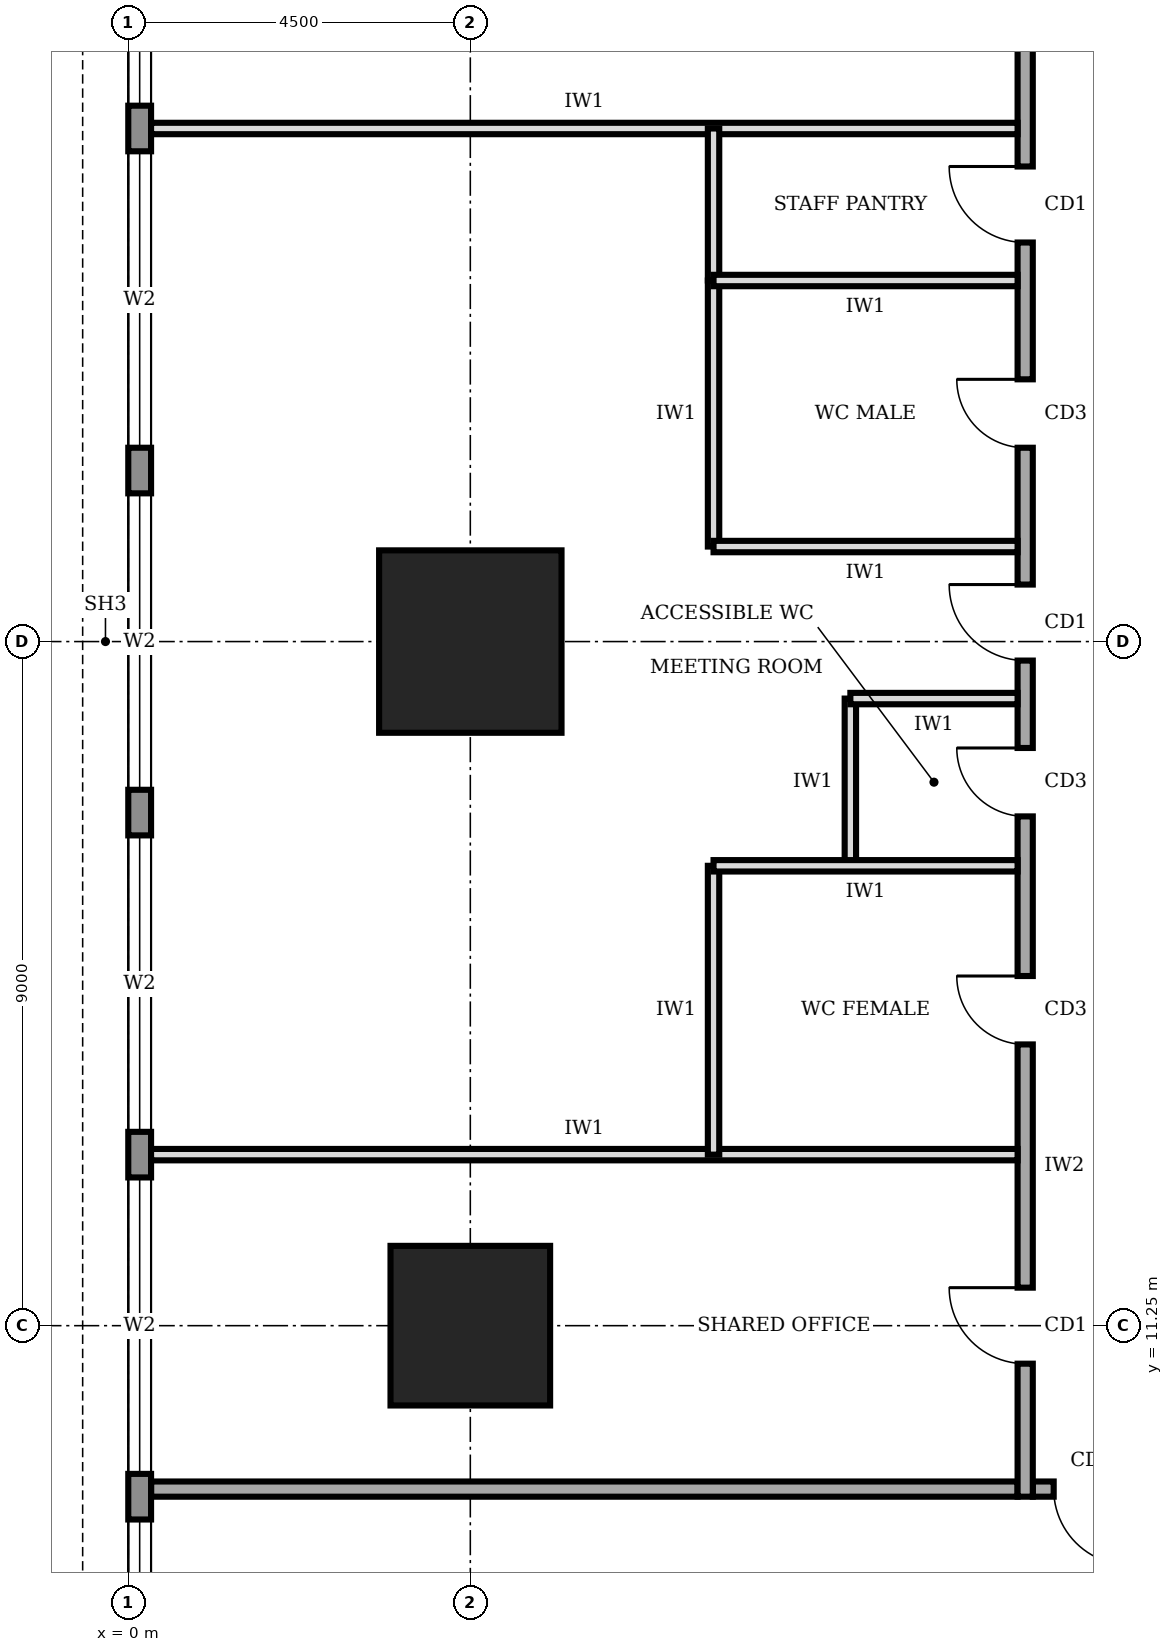
"""IFC4 building model, lengths in metres.
Left out: names, types, materials, properties, quantities, classifications, styles, units other than length and angle.
Written with IfcOpenShell. Run it as: python <this file> out.ifc"""

import sys

from ifc_helpers import new_model, si_unit, direction, frame, frame_2d, origin, origin_2d, place, context, subcontext, project, spatial, rectangle, extrude, element, fill, save


model = new_model("IFC4")
c1 = context("Model", 3, precision=1e-05, world=origin(), true_north=direction((0.0, 1.0)))
c2 = subcontext(c1, "Body", "Model", "MODEL_VIEW")
j1 = project(units=[si_unit("LENGTHUNIT", "METRE"), si_unit("PLANEANGLEUNIT", "RADIAN")], contexts=[c1])
p1 = place(None, origin())
s1 = spatial("IfcSite", under=j1, at=p1, CompositionType="ELEMENT")
p2 = place(p1, origin())
s2 = spatial("IfcBuilding", under=s1, at=p2, CompositionType="ELEMENT")
p3 = place(p2, frame((0.0, 0.0, 137.0)))
s3 = spatial("IfcBuildingStorey", under=s2, at=p3, CompositionType="ELEMENT", Elevation=137.0)
p4 = place(p3, frame((4.5, 11.25, 0.0), z_axis=(0.0, 0.0, 1.0), x_axis=(1.0, 0.0, 0.0)))
e1 = element("IfcColumn", 1, at=p4, inside=s3, PredefinedType="COLUMN", context=c2, shape_type="SweptSolid", body=[
    extrude(rectangle(XDim=2.1, YDim=2.1, at=origin_2d()), origin(), (0.0, 0.0, 1.0), 4.0),
])
p5 = place(p3, frame((4.5, 20.25, 0.0), z_axis=(0.0, 0.0, 1.0), x_axis=(1.0, 0.0, 0.0)))
e2 = element("IfcColumn", 2, at=p5, inside=s3, PredefinedType="COLUMN", context=c2, shape_type="SweptSolid", body=[
    extrude(rectangle(XDim=2.4, YDim=2.4, at=origin_2d()), origin(), (0.0, 0.0, 1.0), 4.0),
])
p6 = place(p3, frame((0.15, 35.98, 0.0), z_axis=(0.0, 0.0, 1.0), x_axis=(0.0, -1.0, 0.0)))
e3 = element("IfcWall", 3, at=p6, inside=s3, PredefinedType="STANDARD", context=c2, shape_type="SweptSolid", body=[
    extrude(rectangle(XDim=31.46, YDim=0.3, at=frame_2d((15.73, 0.0))), origin(), (0.0, 0.0, 1.0), 3.75),
])
p7 = place(p6, frame((27.28, 0.0, 0.6)))
e4 = element("IfcOpeningElement", 4, at=p7, cuts=e3, PredefinedType="OPENING", context=c2, shape_type="SweptSolid", body=[
    extrude(rectangle(XDim=3.9, YDim=2.6, at=frame_2d((1.95, 1.3))), frame((0.0, 0.16, 0.0), z_axis=(0.0, -1.0, 0.0), x_axis=(1.0, 0.0, 0.0)), (0.0, 0.0, 1.0), 0.32),
])
p8 = place(p6, frame((22.78, 0.0, 0.6)))
e5 = element("IfcOpeningElement", 5, at=p8, cuts=e3, PredefinedType="OPENING", context=c2, shape_type="SweptSolid", body=[
    extrude(rectangle(XDim=3.9, YDim=2.6, at=frame_2d((1.95, 1.3))), frame((0.0, 0.16, 0.0), z_axis=(0.0, -1.0, 0.0), x_axis=(1.0, 0.0, 0.0)), (0.0, 0.0, 1.0), 0.32),
])
p9 = place(p6, frame((18.28, 0.0, 0.6)))
e6 = element("IfcOpeningElement", 6, at=p9, cuts=e3, PredefinedType="OPENING", context=c2, shape_type="SweptSolid", body=[
    extrude(rectangle(XDim=3.9, YDim=2.6, at=frame_2d((1.95, 1.3))), frame((0.0, 0.16, 0.0), z_axis=(0.0, -1.0, 0.0), x_axis=(1.0, 0.0, 0.0)), (0.0, 0.0, 1.0), 0.32),
])
p10 = place(p6, frame((13.78, 0.0, 0.6)))
e7 = element("IfcOpeningElement", 7, at=p10, cuts=e3, PredefinedType="OPENING", context=c2, shape_type="SweptSolid", body=[
    extrude(rectangle(XDim=3.9, YDim=2.6, at=frame_2d((1.95, 1.3))), frame((0.0, 0.16, 0.0), z_axis=(0.0, -1.0, 0.0), x_axis=(1.0, 0.0, 0.0)), (0.0, 0.0, 1.0), 0.32),
])
p11 = place(p6, frame((9.28, 0.0, 0.6)))
e8 = element("IfcOpeningElement", 8, at=p11, cuts=e3, PredefinedType="OPENING", context=c2, shape_type="SweptSolid", body=[
    extrude(rectangle(XDim=3.9, YDim=2.6, at=frame_2d((1.95, 1.3))), frame((0.0, 0.16, 0.0), z_axis=(0.0, -1.0, 0.0), x_axis=(1.0, 0.0, 0.0)), (0.0, 0.0, 1.0), 0.32),
])
p12 = place(p6, frame((4.78, 0.0, 0.6)))
e9 = element("IfcOpeningElement", 9, at=p12, cuts=e3, PredefinedType="OPENING", context=c2, shape_type="SweptSolid", body=[
    extrude(rectangle(XDim=3.9, YDim=2.6, at=frame_2d((1.95, 1.3))), frame((0.0, 0.16, 0.0), z_axis=(0.0, -1.0, 0.0), x_axis=(1.0, 0.0, 0.0)), (0.0, 0.0, 1.0), 0.32),
])
p13 = place(p3, frame((11.9, 9.1, 0.0), z_axis=(0.0, 0.0, 1.0), x_axis=(1.0, 0.0, 0.0)))
e10 = element("IfcWall", 10, at=p13, inside=s3, PredefinedType="SOLIDWALL", context=c2, shape_type="SweptSolid", body=[
    extrude(rectangle(XDim=16.9, YDim=0.2, at=frame_2d((8.45, 0.0))), origin(), (0.0, 0.0, 1.0), 3.75),
])
p14 = place(p13, frame((0.275, 0.0, 0.0)))
e11 = element("IfcOpeningElement", 11, at=p14, cuts=e10, PredefinedType="OPENING", context=c2, shape_type="SweptSolid", body=[
    extrude(rectangle(XDim=1.0, YDim=2.1, at=frame_2d((0.5, 1.05))), frame((0.0, 0.11, 0.0), z_axis=(0.0, -1.0, 0.0), x_axis=(1.0, 0.0, 0.0)), (0.0, 0.0, 1.0), 0.22),
])
p15 = place(p13, frame((5.6, 0.0, 0.0)))
e12 = element("IfcOpeningElement", 12, at=p15, cuts=e10, PredefinedType="OPENING", context=c2, shape_type="SweptSolid", body=[
    extrude(rectangle(XDim=1.0, YDim=2.1, at=frame_2d((0.5, 1.05))), frame((0.0, 0.11, 0.0), z_axis=(0.0, -1.0, 0.0), x_axis=(1.0, 0.0, 0.0)), (0.0, 0.0, 1.0), 0.22),
])
p16 = place(p13, frame((12.35, 0.0, 0.0)))
e13 = element("IfcOpeningElement", 13, at=p16, cuts=e10, PredefinedType="OPENING", context=c2, shape_type="SweptSolid", body=[
    extrude(rectangle(XDim=1.0, YDim=2.1, at=frame_2d((0.5, 1.05))), frame((0.0, 0.11, 0.0), z_axis=(0.0, -1.0, 0.0), x_axis=(1.0, 0.0, 0.0)), (0.0, 0.0, 1.0), 0.22),
])
p17 = place(p13, frame((15.425, 0.0, 0.0)))
e14 = element("IfcOpeningElement", 14, at=p17, cuts=e10, PredefinedType="OPENING", context=c2, shape_type="SweptSolid", body=[
    extrude(rectangle(XDim=1.0, YDim=2.1, at=frame_2d((0.5, 1.05))), frame((0.0, 0.11, 0.0), z_axis=(0.0, -1.0, 0.0), x_axis=(1.0, 0.0, 0.0)), (0.0, 0.0, 1.0), 0.22),
])
p18 = place(p3, frame((11.8, 31.3, 0.0), z_axis=(0.0, 0.0, 1.0), x_axis=(0.0, -1.0, 0.0)))
e15 = element("IfcWall", 15, at=p18, inside=s3, PredefinedType="SOLIDWALL", context=c2, shape_type="SweptSolid", body=[
    extrude(rectangle(XDim=22.3, YDim=0.2, at=frame_2d((11.15, 0.0))), origin(), (0.0, 0.0, 1.0), 3.75),
])
p19 = place(p18, frame((19.55, 0.0, 0.0)))
e16 = element("IfcOpeningElement", 16, at=p19, cuts=e15, PredefinedType="OPENING", context=c2, shape_type="SweptSolid", body=[
    extrude(rectangle(XDim=1.0, YDim=2.1, at=frame_2d((0.5, 1.05))), frame((0.0, 0.11, 0.0), z_axis=(0.0, -1.0, 0.0), x_axis=(1.0, 0.0, 0.0)), (0.0, 0.0, 1.0), 0.22),
])
p20 = place(p18, frame((15.45, 0.0, 0.0)))
e17 = element("IfcOpeningElement", 17, at=p20, cuts=e15, PredefinedType="OPENING", context=c2, shape_type="SweptSolid", body=[
    extrude(rectangle(XDim=0.9, YDim=2.1, at=frame_2d((0.45, 1.05))), frame((0.0, 0.11, 0.0), z_axis=(0.0, -1.0, 0.0), x_axis=(1.0, 0.0, 0.0)), (0.0, 0.0, 1.0), 0.22),
])
p21 = place(p18, frame((12.45, 0.0, 0.0)))
e18 = element("IfcOpeningElement", 18, at=p21, cuts=e15, PredefinedType="OPENING", context=c2, shape_type="SweptSolid", body=[
    extrude(rectangle(XDim=0.9, YDim=2.1, at=frame_2d((0.45, 1.05))), frame((0.0, 0.11, 0.0), z_axis=(0.0, -1.0, 0.0), x_axis=(1.0, 0.0, 0.0)), (0.0, 0.0, 1.0), 0.22),
])
p22 = place(p18, frame((7.6, 0.0, 0.0)))
e19 = element("IfcOpeningElement", 19, at=p22, cuts=e15, PredefinedType="OPENING", context=c2, shape_type="SweptSolid", body=[
    extrude(rectangle(XDim=0.9, YDim=2.1, at=frame_2d((0.45, 1.05))), frame((0.0, 0.11, 0.0), z_axis=(0.0, -1.0, 0.0), x_axis=(1.0, 0.0, 0.0)), (0.0, 0.0, 1.0), 0.22),
])
p23 = place(p18, frame((4.8, 0.0, 0.0)))
e20 = element("IfcOpeningElement", 20, at=p23, cuts=e15, PredefinedType="OPENING", context=c2, shape_type="SweptSolid", body=[
    extrude(rectangle(XDim=1.0, YDim=2.1, at=frame_2d((0.5, 1.05))), frame((0.0, 0.11, 0.0), z_axis=(0.0, -1.0, 0.0), x_axis=(1.0, 0.0, 0.0)), (0.0, 0.0, 1.0), 0.22),
])
p24 = place(p18, frame((10.3, 0.0, 0.0)))
e21 = element("IfcOpeningElement", 21, at=p24, cuts=e15, PredefinedType="OPENING", context=c2, shape_type="SweptSolid", body=[
    extrude(rectangle(XDim=1.0, YDim=2.1, at=frame_2d((0.5, 1.05))), frame((0.0, 0.11, 0.0), z_axis=(0.0, -1.0, 0.0), x_axis=(1.0, 0.0, 0.0)), (0.0, 0.0, 1.0), 0.22),
])
p25 = place(p18, frame((1.55, 0.0, 0.0)))
e22 = element("IfcOpeningElement", 22, at=p25, cuts=e15, PredefinedType="OPENING", context=c2, shape_type="SweptSolid", body=[
    extrude(rectangle(XDim=1.0, YDim=2.1, at=frame_2d((0.5, 1.05))), frame((0.0, 0.11, 0.0), z_axis=(0.0, -1.0, 0.0), x_axis=(1.0, 0.0, 0.0)), (0.0, 0.0, 1.0), 0.22),
])
p26 = place(p3, frame((0.3, 9.1, 0.0), z_axis=(0.0, 0.0, 1.0), x_axis=(1.0, 0.0, 0.0)))
e23 = element("IfcWall", 23, at=p26, inside=s3, PredefinedType="SOLIDWALL", context=c2, shape_type="SweptSolid", body=[
    extrude(rectangle(XDim=11.4, YDim=0.2, at=frame_2d((5.7, 0.0))), origin(), (0.0, 0.0, 1.0), 3.75),
])
for number, where, z_axis, x_axis in (
    (24, (0.3, 13.5, 0.0), (0.0, 0.0, 1.0), (1.0, 0.0, 0.0)),
    (25, (0.3, 27.0, 0.0), (0.0, 0.0, 1.0), (1.0, 0.0, 0.0)),
):
    element("IfcWall", number, at=place(p3, frame(where, z_axis=z_axis, x_axis=x_axis)), inside=s3, PredefinedType="PARTITIONING", context=c2, shape_type="SweptSolid", body=[
        extrude(rectangle(XDim=11.4, YDim=0.15, at=frame_2d((5.7, 0.0))), origin(), (0.0, 0.0, 1.0), 3.75),
    ])
p27 = place(p3, frame((11.7, 17.3, 0.0), z_axis=(0.0, 0.0, 1.0), x_axis=(-1.0, 0.0, 0.0)))
e26 = element("IfcWall", 26, at=p27, inside=s3, PredefinedType="PARTITIONING", context=c2, shape_type="SweptSolid", body=[
    extrude(rectangle(XDim=4.0, YDim=0.15, at=frame_2d((2.0, 0.0))), origin(), (0.0, 0.0, 1.0), 3.75),
])
p28 = place(p3, frame((11.7, 19.5, 0.0), z_axis=(0.0, 0.0, 1.0), x_axis=(-1.0, 0.0, 0.0)))
e27 = element("IfcWall", 27, at=p28, inside=s3, PredefinedType="PARTITIONING", context=c2, shape_type="SweptSolid", body=[
    extrude(rectangle(XDim=2.2, YDim=0.15, at=frame_2d((1.1, 0.0))), origin(), (0.0, 0.0, 1.0), 2.85),
])
for number, where, z_axis, x_axis in (
    (28, (11.7, 21.5, 0.0), (0.0, 0.0, 1.0), (-1.0, 0.0, 0.0)),
    (29, (11.7, 25.0, 0.0), (0.0, 0.0, 1.0), (-1.0, 0.0, 0.0)),
):
    element("IfcWall", number, at=place(p3, frame(where, z_axis=z_axis, x_axis=x_axis)), inside=s3, PredefinedType="PARTITIONING", context=c2, shape_type="SweptSolid", body=[
        extrude(rectangle(XDim=4.0, YDim=0.15, at=frame_2d((2.0, 0.0))), origin(), (0.0, 0.0, 1.0), 3.75),
    ])
p29 = place(p3, frame((7.7, 13.5, 0.0), z_axis=(0.0, 0.0, 1.0), x_axis=(0.0, 1.0, 0.0)))
e30 = element("IfcWall", 30, at=p29, inside=s3, PredefinedType="PARTITIONING", context=c2, shape_type="SweptSolid", body=[
    extrude(rectangle(XDim=3.8, YDim=0.15, at=frame_2d((1.9, 0.0))), origin(), (0.0, 0.0, 1.0), 3.75),
])
p30 = place(p3, frame((9.5, 17.3, 0.0), z_axis=(0.0, 0.0, 1.0), x_axis=(0.0, 1.0, 0.0)))
e31 = element("IfcWall", 31, at=p30, inside=s3, PredefinedType="PARTITIONING", context=c2, shape_type="SweptSolid", body=[
    extrude(rectangle(XDim=2.2, YDim=0.15, at=frame_2d((1.1, 0.0))), origin(), (0.0, 0.0, 1.0), 3.75),
])
p31 = place(p3, frame((7.7, 21.5, 0.0), z_axis=(0.0, 0.0, 1.0), x_axis=(0.0, 1.0, 0.0)))
e32 = element("IfcWall", 32, at=p31, inside=s3, PredefinedType="PARTITIONING", context=c2, shape_type="SweptSolid", body=[
    extrude(rectangle(XDim=3.5, YDim=0.15, at=frame_2d((1.75, 0.0))), origin(), (0.0, 0.0, 1.0), 3.75),
])
p32 = place(p3, frame((7.7, 25.0, 0.0), z_axis=(0.0, 0.0, 1.0), x_axis=(0.0, 1.0, 0.0)))
e33 = element("IfcWall", 33, at=p32, inside=s3, PredefinedType="PARTITIONING", context=c2, shape_type="SweptSolid", body=[
    extrude(rectangle(XDim=2.0, YDim=0.15, at=frame_2d((1.0, 0.0))), origin(), (0.0, 0.0, 1.0), 3.75),
])
p33 = place(p7, origin())
e34 = element("IfcWindow", 34, at=p33, inside=s3, PartitioningType="SINGLE_PANEL", PredefinedType="WINDOW", context=c2, shape_type="SweptSolid", body=[
    extrude(rectangle(XDim=3.9, YDim=2.6, at=frame_2d((1.95, 1.3))), frame((0.0, 0.03, 0.0), z_axis=(0.0, -1.0, 0.0), x_axis=(1.0, 0.0, 0.0)), (0.0, 0.0, 1.0), 0.06),
])
fill(e4, e34)
p34 = place(p8, origin())
e35 = element("IfcWindow", 35, at=p34, inside=s3, PartitioningType="SINGLE_PANEL", PredefinedType="WINDOW", context=c2, shape_type="SweptSolid", body=[
    extrude(rectangle(XDim=3.9, YDim=2.6, at=frame_2d((1.95, 1.3))), frame((0.0, 0.03, 0.0), z_axis=(0.0, -1.0, 0.0), x_axis=(1.0, 0.0, 0.0)), (0.0, 0.0, 1.0), 0.06),
])
fill(e5, e35)
p35 = place(p9, origin())
e36 = element("IfcWindow", 36, at=p35, inside=s3, PartitioningType="SINGLE_PANEL", PredefinedType="WINDOW", context=c2, shape_type="SweptSolid", body=[
    extrude(rectangle(XDim=3.9, YDim=2.6, at=frame_2d((1.95, 1.3))), frame((0.0, 0.03, 0.0), z_axis=(0.0, -1.0, 0.0), x_axis=(1.0, 0.0, 0.0)), (0.0, 0.0, 1.0), 0.06),
])
fill(e6, e36)
p36 = place(p10, origin())
e37 = element("IfcWindow", 37, at=p36, inside=s3, PartitioningType="SINGLE_PANEL", PredefinedType="WINDOW", context=c2, shape_type="SweptSolid", body=[
    extrude(rectangle(XDim=3.9, YDim=2.6, at=frame_2d((1.95, 1.3))), frame((0.0, 0.03, 0.0), z_axis=(0.0, -1.0, 0.0), x_axis=(1.0, 0.0, 0.0)), (0.0, 0.0, 1.0), 0.06),
])
fill(e7, e37)
p37 = place(p11, origin())
e38 = element("IfcWindow", 38, at=p37, inside=s3, PartitioningType="SINGLE_PANEL", PredefinedType="WINDOW", context=c2, shape_type="SweptSolid", body=[
    extrude(rectangle(XDim=3.9, YDim=2.6, at=frame_2d((1.95, 1.3))), frame((0.0, 0.03, 0.0), z_axis=(0.0, -1.0, 0.0), x_axis=(1.0, 0.0, 0.0)), (0.0, 0.0, 1.0), 0.06),
])
fill(e8, e38)
p38 = place(p12, origin())
e39 = element("IfcWindow", 39, at=p38, inside=s3, PartitioningType="SINGLE_PANEL", PredefinedType="WINDOW", context=c2, shape_type="SweptSolid", body=[
    extrude(rectangle(XDim=3.9, YDim=2.6, at=frame_2d((1.95, 1.3))), frame((0.0, 0.03, 0.0), z_axis=(0.0, -1.0, 0.0), x_axis=(1.0, 0.0, 0.0)), (0.0, 0.0, 1.0), 0.06),
])
fill(e9, e39)
p39 = place(p14, frame((1.0, 0.0, 0.0), z_axis=(0.0, 0.0, 1.0), x_axis=(-1.0, 0.0, 0.0)))
e40 = element("IfcDoor", 40, at=p39, inside=s3, OperationType="SINGLE_SWING_LEFT", PredefinedType="DOOR", context=c2, shape_type="SweptSolid", body=[
    extrude(rectangle(XDim=1.0, YDim=2.1, at=frame_2d((0.5, 1.05))), frame((0.0, 0.025, 0.0), z_axis=(0.0, -1.0, 0.0), x_axis=(1.0, 0.0, 0.0)), (0.0, 0.0, 1.0), 0.05),
])
fill(e11, e40)
p40 = place(p19, frame((1.0, 0.0, 0.0), z_axis=(0.0, 0.0, 1.0), x_axis=(-1.0, 0.0, 0.0)))
e41 = element("IfcDoor", 41, at=p40, inside=s3, OperationType="SINGLE_SWING_RIGHT", PredefinedType="DOOR", context=c2, shape_type="SweptSolid", body=[
    extrude(rectangle(XDim=1.0, YDim=2.1, at=frame_2d((0.5, 1.05))), frame((0.0, 0.025, 0.0), z_axis=(0.0, -1.0, 0.0), x_axis=(1.0, 0.0, 0.0)), (0.0, 0.0, 1.0), 0.05),
])
fill(e16, e41)
p41 = place(p20, frame((0.9, 0.0, 0.0), z_axis=(0.0, 0.0, 1.0), x_axis=(-1.0, 0.0, 0.0)))
e42 = element("IfcDoor", 42, at=p41, inside=s3, OperationType="SINGLE_SWING_RIGHT", PredefinedType="DOOR", context=c2, shape_type="SweptSolid", body=[
    extrude(rectangle(XDim=0.9, YDim=2.1, at=frame_2d((0.45, 1.05))), frame((0.0, 0.025, 0.0), z_axis=(0.0, -1.0, 0.0), x_axis=(1.0, 0.0, 0.0)), (0.0, 0.0, 1.0), 0.05),
])
fill(e17, e42)
p42 = place(p21, frame((0.9, 0.0, 0.0), z_axis=(0.0, 0.0, 1.0), x_axis=(-1.0, 0.0, 0.0)))
e43 = element("IfcDoor", 43, at=p42, inside=s3, OperationType="SINGLE_SWING_RIGHT", PredefinedType="DOOR", context=c2, shape_type="SweptSolid", body=[
    extrude(rectangle(XDim=0.9, YDim=2.1, at=frame_2d((0.45, 1.05))), frame((0.0, 0.025, 0.0), z_axis=(0.0, -1.0, 0.0), x_axis=(1.0, 0.0, 0.0)), (0.0, 0.0, 1.0), 0.05),
])
fill(e18, e43)
p43 = place(p22, frame((0.9, 0.0, 0.0), z_axis=(0.0, 0.0, 1.0), x_axis=(-1.0, 0.0, 0.0)))
e44 = element("IfcDoor", 44, at=p43, inside=s3, OperationType="SINGLE_SWING_RIGHT", PredefinedType="DOOR", context=c2, shape_type="SweptSolid", body=[
    extrude(rectangle(XDim=0.9, YDim=2.1, at=frame_2d((0.45, 1.05))), frame((0.0, 0.025, 0.0), z_axis=(0.0, -1.0, 0.0), x_axis=(1.0, 0.0, 0.0)), (0.0, 0.0, 1.0), 0.05),
])
fill(e19, e44)
p44 = place(p23, frame((1.0, 0.0, 0.0), z_axis=(0.0, 0.0, 1.0), x_axis=(-1.0, 0.0, 0.0)))
e45 = element("IfcDoor", 45, at=p44, inside=s3, OperationType="SINGLE_SWING_RIGHT", PredefinedType="DOOR", context=c2, shape_type="SweptSolid", body=[
    extrude(rectangle(XDim=1.0, YDim=2.1, at=frame_2d((0.5, 1.05))), frame((0.0, 0.025, 0.0), z_axis=(0.0, -1.0, 0.0), x_axis=(1.0, 0.0, 0.0)), (0.0, 0.0, 1.0), 0.05),
])
fill(e20, e45)
p45 = place(p24, frame((1.0, 0.0, 0.0), z_axis=(0.0, 0.0, 1.0), x_axis=(-1.0, 0.0, 0.0)))
e46 = element("IfcDoor", 46, at=p45, inside=s3, OperationType="SINGLE_SWING_RIGHT", PredefinedType="DOOR", context=c2, shape_type="SweptSolid", body=[
    extrude(rectangle(XDim=1.0, YDim=2.1, at=frame_2d((0.5, 1.05))), frame((0.0, 0.025, 0.0), z_axis=(0.0, -1.0, 0.0), x_axis=(1.0, 0.0, 0.0)), (0.0, 0.0, 1.0), 0.05),
])
fill(e21, e46)
save(model, sys.argv[1])
